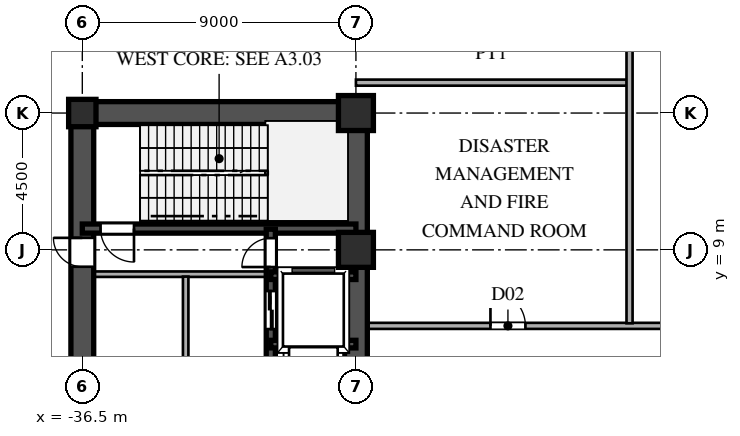
"""IFC4 building model, lengths in metres.
Left out: names, types, materials, properties, quantities, classifications, styles, units other than length and angle.
Written with IfcOpenShell. Run it as: python <this file> out.ifc"""

import sys

from ifc_helpers import new_model, si_unit, direction, frame, frame_2d, origin, origin_2d, place, context, subcontext, project, spatial, rectangle, hollow_rectangle, i_section, extrude, source, transform, mapped, element, fill, save


model = new_model("IFC4")
c1 = context("Model", 3, precision=1e-05, world=origin(), true_north=direction((0.0, 1.0)))
c2 = subcontext(c1, "Body", "Model", "MODEL_VIEW")
j1 = project(units=[si_unit("LENGTHUNIT", "METRE"), si_unit("PLANEANGLEUNIT", "RADIAN")], contexts=[c1])
p1 = place(None, origin())
s1 = spatial("IfcSite", under=j1, at=p1, CompositionType="ELEMENT")
p2 = place(p1, origin())
s2 = spatial("IfcBuilding", under=s1, at=p2, CompositionType="ELEMENT")
p3 = place(p2, origin())
s3 = spatial("IfcBuildingStorey", under=s2, at=p3, CompositionType="ELEMENT", Elevation=0.0)
m1 = source(origin(), c2, "Body", "SweptSolid", [
    extrude(hollow_rectangle(XDim=1.15, YDim=1.15, WallThickness=0.048, at=origin_2d()), origin(), (0.0, 0.0, 1.0), 5.4),
])
for number, where, z_axis, x_axis in (
    (1, (-27.5, 9.0, 0.0), (0.0, 0.0, 1.0), (1.0, 0.0, 0.0)),
    (2, (-27.5, 13.5, 0.0), (0.0, 0.0, 1.0), (1.0, 0.0, 0.0)),
):
    element("IfcColumn", number, at=place(p3, frame(where, z_axis=z_axis, x_axis=x_axis)), inside=s3, PredefinedType="COLUMN", context=c2, shape_type="MappedRepresentation", body=[
        mapped(m1, transform((0.0, 0.0, 0.0), scale=1.0)),
    ])
m2 = source(origin(), c2, "Body", "SweptSolid", [
    extrude(i_section(OverallWidth=0.9, OverallDepth=0.9, WebThickness=0.036, FlangeThickness=0.055, at=origin_2d()), origin(), (0.0, 0.0, 1.0), 5.4),
])
p4 = place(p3, frame((-36.5, 13.5, 0.0), z_axis=(0.0, 0.0, 1.0), x_axis=(1.0, 0.0, 0.0)))
e3 = element("IfcColumn", 3, at=p4, inside=s3, PredefinedType="COLUMN", context=c2, shape_type="MappedRepresentation", body=[
    mapped(m2, transform((0.0, 0.0, 0.0), scale=1.0)),
])
p5 = place(p3, frame((-27.5, 1.3, 0.0), z_axis=(0.0, 0.0, 1.0), x_axis=(0.0, 1.0, 0.0)))
e4 = element("IfcWall", 4, at=p5, inside=s3, PredefinedType="SHEAR", context=c2, shape_type="SweptSolid", body=[
    extrude(rectangle(XDim=12.2, YDim=0.75, at=frame_2d((6.1, 0.0))), origin(), (0.0, 0.0, 1.0), 5.12),
])
p6 = place(p3, frame((-36.5, 13.5, 0.0), z_axis=(0.0, 0.0, 1.0), x_axis=(1.0, 0.0, 0.0)))
e5 = element("IfcWall", 5, at=p6, inside=s3, PredefinedType="SHEAR", context=c2, shape_type="SweptSolid", body=[
    extrude(rectangle(XDim=9.0, YDim=0.75, at=frame_2d((4.5, 0.0))), origin(), (0.0, 0.0, 1.0), 5.12),
])
p7 = place(p3, frame((-36.5, 8.2, 0.0), z_axis=(0.0, 0.0, 1.0), x_axis=(0.0, 1.0, 0.0)))
e6 = element("IfcWall", 6, at=p7, inside=s3, PredefinedType="SHEAR", context=c2, shape_type="SweptSolid", body=[
    extrude(rectangle(XDim=5.45, YDim=0.75, at=frame_2d((2.725, 0.0))), origin(), (0.0, 0.0, 1.0), 5.12),
])
p8 = place(p7, frame((0.245, 0.0, 0.0)))
e7 = element("IfcOpeningElement", 7, at=p8, cuts=e6, PredefinedType="OPENING", context=c2, shape_type="SweptSolid", body=[
    extrude(rectangle(XDim=0.95, YDim=2.15, at=frame_2d((0.475, 1.075))), frame((0.0, 0.385, 0.0), z_axis=(0.0, -1.0, 0.0), x_axis=(1.0, 0.0, 0.0)), (0.0, 0.0, 1.0), 0.77),
])
p9 = place(p3, frame((-36.5, 1.3, 0.0), z_axis=(0.0, 0.0, 1.0), x_axis=(0.0, 1.0, 0.0)))
e8 = element("IfcWall", 8, at=p9, inside=s3, PredefinedType="SHEAR", context=c2, shape_type="SweptSolid", body=[
    extrude(rectangle(XDim=6.9, YDim=0.75, at=frame_2d((3.45, 0.0))), origin(), (0.0, 0.0, 1.0), 5.12),
])
p10 = place(p9, frame((2.975, 0.0, 0.0)))
e9 = element("IfcOpeningElement", 9, at=p10, cuts=e8, PredefinedType="OPENING", context=c2, shape_type="SweptSolid", body=[
    extrude(rectangle(XDim=0.95, YDim=2.15, at=frame_2d((0.475, 1.075))), frame((0.0, 0.385, 0.0), z_axis=(0.0, -1.0, 0.0), x_axis=(1.0, 0.0, 0.0)), (0.0, 0.0, 1.0), 0.77),
])
p11 = place(p3, frame((-36.5, 9.7, 0.0), z_axis=(0.0, 0.0, 1.0), x_axis=(1.0, 0.0, 0.0)))
e10 = element("IfcWall", 10, at=p11, inside=s3, PredefinedType="SHEAR", context=c2, shape_type="SweptSolid", body=[
    extrude(rectangle(XDim=9.0, YDim=0.3, at=frame_2d((4.5, 0.0))), origin(), (0.0, 0.0, 1.0), 5.12),
])
p12 = place(p11, frame((0.6, 0.0, 0.0)))
e11 = element("IfcOpeningElement", 11, at=p12, cuts=e10, PredefinedType="OPENING", context=c2, shape_type="SweptSolid", body=[
    extrude(rectangle(XDim=1.1, YDim=2.2, at=frame_2d((0.55, 1.1))), frame((0.0, 0.16, 0.0), z_axis=(0.0, -1.0, 0.0), x_axis=(1.0, 0.0, 0.0)), (0.0, 0.0, 1.0), 0.32),
])
for number, where, z_axis, x_axis in (
    (12, (-30.3, 5.9, 0.0), (0.0, 0.0, 1.0), (1.0, 0.0, 0.0)),
    (13, (-30.3, 8.15, 0.0), (0.0, 0.0, 1.0), (1.0, 0.0, 0.0)),
):
    element("IfcWall", number, at=place(p3, frame(where, z_axis=z_axis, x_axis=x_axis)), inside=s3, PredefinedType="SHEAR", context=c2, shape_type="SweptSolid", body=[
        extrude(rectangle(XDim=2.8, YDim=0.25, at=frame_2d((1.4, 0.0))), origin(), (0.0, 0.0, 1.0), 5.12),
    ])
p13 = place(p3, frame((-30.3, 3.6, 0.0), z_axis=(0.0, 0.0, 1.0), x_axis=(0.0, 1.0, 0.0)))
e14 = element("IfcWall", 14, at=p13, inside=s3, PredefinedType="SHEAR", context=c2, shape_type="SweptSolid", body=[
    extrude(rectangle(XDim=2.3, YDim=0.3, at=frame_2d((1.15, 0.0))), origin(), (0.0, 0.0, 1.0), 5.12),
])
p14 = place(p13, frame((0.6, 0.0, 0.0)))
e15 = element("IfcOpeningElement", 15, at=p14, cuts=e14, PredefinedType="OPENING", context=c2, shape_type="SweptSolid", body=[
    extrude(rectangle(XDim=1.1, YDim=2.2, at=frame_2d((0.55, 1.1))), frame((0.0, 0.16, 0.0), z_axis=(0.0, -1.0, 0.0), x_axis=(1.0, 0.0, 0.0)), (0.0, 0.0, 1.0), 0.32),
])
p15 = place(p3, frame((-30.3, 5.9, 0.0), z_axis=(0.0, 0.0, 1.0), x_axis=(0.0, 1.0, 0.0)))
e16 = element("IfcWall", 16, at=p15, inside=s3, PredefinedType="SHEAR", context=c2, shape_type="SweptSolid", body=[
    extrude(rectangle(XDim=2.25, YDim=0.3, at=frame_2d((1.125, 0.0))), origin(), (0.0, 0.0, 1.0), 5.12),
])
p16 = place(p15, frame((0.495, 0.0, 0.0)))
e17 = element("IfcOpeningElement", 17, at=p16, cuts=e16, PredefinedType="OPENING", context=c2, shape_type="SweptSolid", body=[
    extrude(rectangle(XDim=1.25, YDim=2.3, at=frame_2d((0.625, 1.15))), frame((0.0, 0.16, 0.0), z_axis=(0.0, -1.0, 0.0), x_axis=(1.0, 0.0, 0.0)), (0.0, 0.0, 1.0), 0.32),
])
p17 = place(p3, frame((-30.3, 8.15, 0.0), z_axis=(0.0, 0.0, 1.0), x_axis=(0.0, 1.0, 0.0)))
e18 = element("IfcWall", 18, at=p17, inside=s3, PredefinedType="SHEAR", context=c2, shape_type="SweptSolid", body=[
    extrude(rectangle(XDim=1.53, YDim=0.3, at=frame_2d((0.765, 0.0))), origin(), (0.0, 0.0, 1.0), 5.12),
])
p18 = place(p17, frame((0.285, 0.0, 0.0)))
e19 = element("IfcOpeningElement", 19, at=p18, cuts=e18, PredefinedType="OPENING", context=c2, shape_type="SweptSolid", body=[
    extrude(rectangle(XDim=0.95, YDim=2.15, at=frame_2d((0.475, 1.075))), frame((0.0, 0.16, 0.0), z_axis=(0.0, -1.0, 0.0), x_axis=(1.0, 0.0, 0.0)), (0.0, 0.0, 1.0), 0.32),
])
p19 = place(p3, frame((-36.15, 8.2, 0.0), z_axis=(0.0, 0.0, 1.0), x_axis=(1.0, 0.0, 0.0)))
e20 = element("IfcWall", 20, at=p19, inside=s3, PredefinedType="PARTITIONING", context=c2, shape_type="SweptSolid", body=[
    extrude(rectangle(XDim=5.7, YDim=0.18, at=frame_2d((2.85, 0.0))), origin(), (0.0, 0.0, 1.0), 5.12),
])
p20 = place(p3, frame((-33.1, 1.38, 0.0), z_axis=(0.0, 0.0, 1.0), x_axis=(0.0, 1.0, 0.0)))
e21 = element("IfcWall", 21, at=p20, inside=s3, PredefinedType="PARTITIONING", context=c2, shape_type="SweptSolid", body=[
    extrude(rectangle(XDim=6.74, YDim=0.18, at=frame_2d((3.37, 0.0))), origin(), (0.0, 0.0, 1.0), 5.12),
])
p21 = place(p3, frame((-27.12, 6.5, 0.0), z_axis=(0.0, 0.0, 1.0), x_axis=(1.0, 0.0, 0.0)))
e22 = element("IfcWall", 22, at=p21, inside=s3, PredefinedType="PARTITIONING", context=c2, shape_type="SweptSolid", body=[
    extrude(rectangle(XDim=54.24, YDim=0.2, at=frame_2d((27.12, 0.0))), origin(), (0.0, 0.0, 1.0), 5.12),
])
p22 = place(p21, frame((4.045, 0.0, 0.0)))
e23 = element("IfcOpeningElement", 23, at=p22, cuts=e22, PredefinedType="OPENING", context=c2, shape_type="SweptSolid", body=[
    extrude(rectangle(XDim=1.15, YDim=2.2, at=frame_2d((0.575, 1.1))), frame((0.0, 0.11, 0.0), z_axis=(0.0, -1.0, 0.0), x_axis=(1.0, 0.0, 0.0)), (0.0, 0.0, 1.0), 0.22),
])
p23 = place(p21, frame((17.395, 0.0, 0.0)))
e24 = element("IfcOpeningElement", 24, at=p23, cuts=e22, PredefinedType="OPENING", context=c2, shape_type="SweptSolid", body=[
    extrude(rectangle(XDim=0.95, YDim=2.15, at=frame_2d((0.475, 1.075))), frame((0.0, 0.11, 0.0), z_axis=(0.0, -1.0, 0.0), x_axis=(1.0, 0.0, 0.0)), (0.0, 0.0, 1.0), 0.22),
])
p24 = place(p21, frame((47.33, 0.0, 0.0)))
e25 = element("IfcOpeningElement", 25, at=p24, cuts=e22, PredefinedType="OPENING", context=c2, shape_type="SweptSolid", body=[
    extrude(rectangle(XDim=0.88, YDim=2.1, at=frame_2d((0.44, 1.05))), frame((0.0, 0.11, 0.0), z_axis=(0.0, -1.0, 0.0), x_axis=(1.0, 0.0, 0.0)), (0.0, 0.0, 1.0), 0.22),
])
p25 = place(p21, frame((51.68, 0.0, 0.0)))
e26 = element("IfcOpeningElement", 26, at=p25, cuts=e22, PredefinedType="OPENING", context=c2, shape_type="SweptSolid", body=[
    extrude(rectangle(XDim=0.88, YDim=2.1, at=frame_2d((0.44, 1.05))), frame((0.0, 0.11, 0.0), z_axis=(0.0, -1.0, 0.0), x_axis=(1.0, 0.0, 0.0)), (0.0, 0.0, 1.0), 0.22),
])
p26 = place(p3, frame((-27.5, 14.5, 0.0), z_axis=(0.0, 0.0, 1.0), x_axis=(1.0, 0.0, 0.0)))
e27 = element("IfcWall", 27, at=p26, inside=s3, PredefinedType="PARTITIONING", context=c2, shape_type="SweptSolid", body=[
    extrude(rectangle(XDim=8.915, YDim=0.2, at=frame_2d((4.458, 0.0))), origin(), (0.0, 0.0, 1.0), 5.12),
])
p27 = place(p3, frame((-18.5, 6.585, 0.0), z_axis=(0.0, 0.0, 1.0), x_axis=(0.0, 1.0, 0.0)))
e28 = element("IfcWall", 28, at=p27, inside=s3, PredefinedType="PARTITIONING", context=c2, shape_type="SweptSolid", body=[
    extrude(rectangle(XDim=25.215, YDim=0.2, at=frame_2d((12.607, 0.0))), origin(), (0.0, 0.0, 1.0), 5.12),
])
m3 = source(origin(), c2, "Body", "SweptSolid", [
    extrude(rectangle(XDim=0.95, YDim=2.15, at=frame_2d((0.475, 1.075))), frame((0.0, 0.025, 0.0), z_axis=(0.0, -1.0, 0.0), x_axis=(1.0, 0.0, 0.0)), (0.0, 0.0, 1.0), 0.05),
])
p28 = place(p8, origin())
e29 = element("IfcDoor", 29, at=p28, inside=s3, OperationType="SINGLE_SWING_RIGHT", PredefinedType="DOOR", context=c2, shape_type="MappedRepresentation", body=[
    mapped(m3, transform((0.0, 0.0, 0.0), scale=1.0)),
])
fill(e7, e29)
m4 = source(origin(), c2, "Body", "SweptSolid", [
    extrude(rectangle(XDim=1.1, YDim=2.2, at=frame_2d((0.55, 1.1))), frame((0.0, 0.025, 0.0), z_axis=(0.0, -1.0, 0.0), x_axis=(1.0, 0.0, 0.0)), (0.0, 0.0, 1.0), 0.05),
])
p29 = place(p12, frame((1.1, 0.0, 0.0), z_axis=(0.0, 0.0, 1.0), x_axis=(-1.0, 0.0, 0.0)))
e30 = element("IfcDoor", 30, at=p29, inside=s3, OperationType="SINGLE_SWING_RIGHT", PredefinedType="DOOR", context=c2, shape_type="MappedRepresentation", body=[
    mapped(m4, transform((0.0, 0.0, 0.0), scale=1.0)),
])
fill(e11, e30)
m5 = source(origin(), c2, "Body", "SweptSolid", [
    extrude(rectangle(XDim=1.25, YDim=2.3, at=frame_2d((0.625, 1.15))), frame((0.0, 0.025, 0.0), z_axis=(0.0, -1.0, 0.0), x_axis=(1.0, 0.0, 0.0)), (0.0, 0.0, 1.0), 0.05),
])
p30 = place(p16, origin())
e31 = element("IfcDoor", 31, at=p30, inside=s3, OperationType="DOUBLE_DOOR_SLIDING", PredefinedType="DOOR", context=c2, shape_type="MappedRepresentation", body=[
    mapped(m5, transform((0.0, 0.0, 0.0), scale=1.0)),
])
fill(e17, e31)
p31 = place(p18, origin())
e32 = element("IfcDoor", 32, at=p31, inside=s3, OperationType="SINGLE_SWING_LEFT", PredefinedType="DOOR", context=c2, shape_type="MappedRepresentation", body=[
    mapped(m3, transform((0.0, 0.0, 0.0), scale=1.0)),
])
fill(e19, e32)
m6 = source(origin(), c2, "Body", "SweptSolid", [
    extrude(rectangle(XDim=1.15, YDim=2.2, at=frame_2d((0.575, 1.1))), frame((0.0, 0.025, 0.0), z_axis=(0.0, -1.0, 0.0), x_axis=(1.0, 0.0, 0.0)), (0.0, 0.0, 1.0), 0.05),
])
p32 = place(p22, origin())
e33 = element("IfcDoor", 33, at=p32, inside=s3, OperationType="SINGLE_SWING_LEFT", PredefinedType="DOOR", context=c2, shape_type="MappedRepresentation", body=[
    mapped(m6, transform((0.0, 0.0, 0.0), scale=1.0)),
])
fill(e23, e33)
save(model, sys.argv[1])
